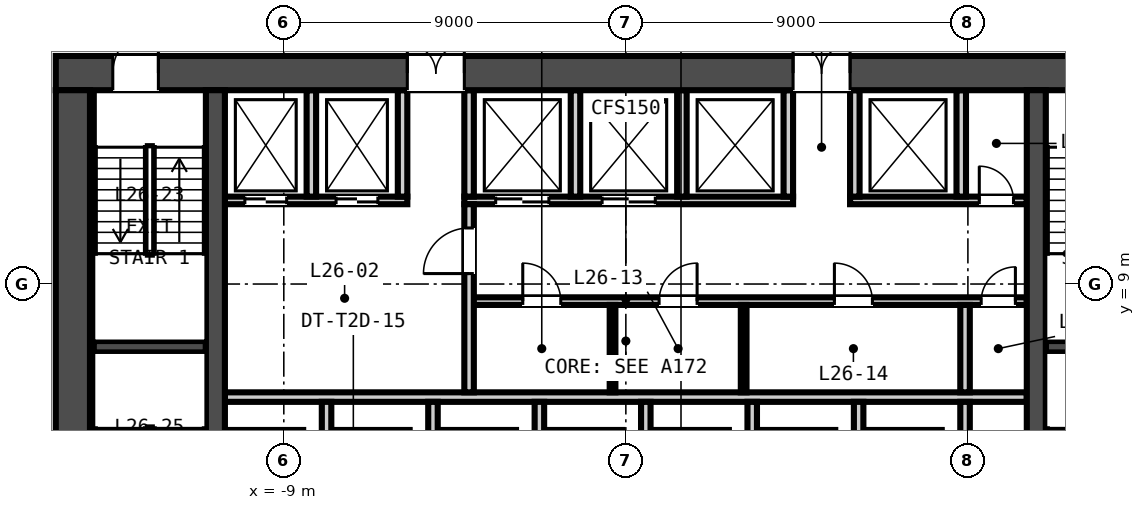
"""IFC4 building model, lengths in metres.
Left out: names, types, materials, properties, quantities, classifications, styles, units other than length and angle.
Written with IfcOpenShell. Run it as: python <this file> out.ifc"""

import sys

from ifc_helpers import new_model, si_unit, direction, frame, frame_2d, origin, place, context, subcontext, project, spatial, rectangle, extrude, element, fill, save


model = new_model("IFC4")
c1 = context("Model", 3, precision=1e-05, world=origin(), true_north=direction((0.0, 1.0)))
c2 = subcontext(c1, "Body", "Model", "MODEL_VIEW")
j1 = project(units=[si_unit("LENGTHUNIT", "METRE"), si_unit("PLANEANGLEUNIT", "RADIAN")], contexts=[c1])
p1 = place(None, origin())
s1 = spatial("IfcSite", under=j1, at=p1, CompositionType="ELEMENT")
p2 = place(p1, origin())
s2 = spatial("IfcBuilding", under=s1, at=p2, CompositionType="ELEMENT")
p3 = place(p2, frame((0.0, 0.0, 109.85)))
s3 = spatial("IfcBuildingStorey", under=s2, at=p3, CompositionType="ELEMENT", Elevation=109.85)
p4 = place(p3, frame((-15.0, 14.55, -0.15), z_axis=(0.0, 0.0, 1.0), x_axis=(1.0, 0.0, 0.0)))
e1 = element("IfcWall", 1, at=p4, inside=s3, PredefinedType="SOLIDWALL", context=c2, shape_type="SweptSolid", body=[
    extrude(rectangle(XDim=30.0, YDim=0.9, at=frame_2d((15.0, 0.0))), origin(), (0.0, 0.0, 1.0), 3.65),
])
p5 = place(p4, frame((9.25, 0.0, 0.15)))
e2 = element("IfcOpeningElement", 2, at=p5, cuts=e1, PredefinedType="OPENING", context=c2, shape_type="SweptSolid", body=[
    extrude(rectangle(XDim=1.5, YDim=2.1, at=frame_2d((0.75, 1.05))), frame((0.0, 0.46, 0.0), z_axis=(0.0, -1.0, 0.0), x_axis=(1.0, 0.0, 0.0)), (0.0, 0.0, 1.0), 0.92),
])
p6 = place(p4, frame((19.4, 0.0, 0.15)))
e3 = element("IfcOpeningElement", 3, at=p6, cuts=e1, PredefinedType="OPENING", context=c2, shape_type="SweptSolid", body=[
    extrude(rectangle(XDim=1.5, YDim=2.1, at=frame_2d((0.75, 1.05))), frame((0.0, 0.46, 0.0), z_axis=(0.0, -1.0, 0.0), x_axis=(1.0, 0.0, 0.0)), (0.0, 0.0, 1.0), 0.92),
])
p7 = place(p4, frame((1.5, 0.0, 0.15)))
e4 = element("IfcOpeningElement", 4, at=p7, cuts=e1, PredefinedType="OPENING", context=c2, shape_type="SweptSolid", body=[
    extrude(rectangle(XDim=1.2, YDim=2.1, at=frame_2d((0.6, 1.05))), frame((0.0, 0.46, 0.0), z_axis=(0.0, -1.0, 0.0), x_axis=(1.0, 0.0, 0.0)), (0.0, 0.0, 1.0), 0.92),
])
p8 = place(p4, frame((27.3, 0.0, 0.15)))
e5 = element("IfcOpeningElement", 5, at=p8, cuts=e1, PredefinedType="OPENING", context=c2, shape_type="SweptSolid", body=[
    extrude(rectangle(XDim=1.2, YDim=2.1, at=frame_2d((0.6, 1.05))), frame((0.0, 0.46, 0.0), z_axis=(0.0, -1.0, 0.0), x_axis=(1.0, 0.0, 0.0)), (0.0, 0.0, 1.0), 0.92),
])
p9 = place(p3, frame((-14.55, 0.9, -0.15), z_axis=(0.0, 0.0, 1.0), x_axis=(0.0, 1.0, 0.0)))
e6 = element("IfcWall", 6, at=p9, inside=s3, PredefinedType="SOLIDWALL", context=c2, shape_type="SweptSolid", body=[
    extrude(rectangle(XDim=13.2, YDim=0.9, at=frame_2d((6.6, 0.0))), origin(), (0.0, 0.0, 1.0), 3.65),
])
for number, where, z_axis, x_axis in (
    (7, (-10.8, 0.9, -0.15), (0.0, 0.0, 1.0), (0.0, 1.0, 0.0)),
    (8, (10.8, 0.9, -0.15), (0.0, 0.0, 1.0), (0.0, 1.0, 0.0)),
):
    element("IfcWall", number, at=place(p3, frame(where, z_axis=z_axis, x_axis=x_axis)), inside=s3, PredefinedType="SOLIDWALL", context=c2, shape_type="SweptSolid", body=[
        extrude(rectangle(XDim=13.2, YDim=0.5, at=frame_2d((6.6, 0.0))), origin(), (0.0, 0.0, 1.0), 3.65),
    ])
p10 = place(p3, frame((-10.55, 6.025, 0.0), z_axis=(0.0, 0.0, 1.0), x_axis=(1.0, 0.0, 0.0)))
e9 = element("IfcWall", 9, at=p10, inside=s3, PredefinedType="PARTITIONING", context=c2, shape_type="SweptSolid", body=[
    extrude(rectangle(XDim=21.1, YDim=0.25, at=frame_2d((10.55, 0.0))), origin(), (0.0, 0.0, 1.0), 3.5),
])
p11 = place(p3, frame((-4.125, 8.55, 0.0), z_axis=(0.0, 0.0, 1.0), x_axis=(1.0, 0.0, 0.0)))
e10 = element("IfcWall", 10, at=p11, inside=s3, PredefinedType="PARTITIONING", context=c2, shape_type="SweptSolid", body=[
    extrude(rectangle(XDim=14.675, YDim=0.2, at=frame_2d((7.337, 0.0))), origin(), (0.0, 0.0, 1.0), 3.5),
])
p12 = place(p11, frame((1.413, 0.0, 0.0)))
e11 = element("IfcOpeningElement", 11, at=p12, cuts=e10, PredefinedType="OPENING", context=c2, shape_type="SweptSolid", body=[
    extrude(rectangle(XDim=1.0, YDim=2.1, at=frame_2d((0.5, 1.05))), frame((0.0, 0.11, 0.0), z_axis=(0.0, -1.0, 0.0), x_axis=(1.0, 0.0, 0.0)), (0.0, 0.0, 1.0), 0.22),
])
p13 = place(p11, frame((5.0, 0.0, 0.0)))
e12 = element("IfcOpeningElement", 12, at=p13, cuts=e10, PredefinedType="OPENING", context=c2, shape_type="SweptSolid", body=[
    extrude(rectangle(XDim=1.0, YDim=2.1, at=frame_2d((0.5, 1.05))), frame((0.0, 0.11, 0.0), z_axis=(0.0, -1.0, 0.0), x_axis=(1.0, 0.0, 0.0)), (0.0, 0.0, 1.0), 0.22),
])
p14 = place(p11, frame((9.613, 0.0, 0.0)))
e13 = element("IfcOpeningElement", 13, at=p14, cuts=e10, PredefinedType="OPENING", context=c2, shape_type="SweptSolid", body=[
    extrude(rectangle(XDim=1.0, YDim=2.1, at=frame_2d((0.5, 1.05))), frame((0.0, 0.11, 0.0), z_axis=(0.0, -1.0, 0.0), x_axis=(1.0, 0.0, 0.0)), (0.0, 0.0, 1.0), 0.22),
])
p15 = place(p11, frame((13.475, 0.0, 0.0)))
e14 = element("IfcOpeningElement", 14, at=p15, cuts=e10, PredefinedType="OPENING", context=c2, shape_type="SweptSolid", body=[
    extrude(rectangle(XDim=0.9, YDim=2.1, at=frame_2d((0.45, 1.05))), frame((0.0, 0.11, 0.0), z_axis=(0.0, -1.0, 0.0), x_axis=(1.0, 0.0, 0.0)), (0.0, 0.0, 1.0), 0.22),
])
p16 = place(p3, frame((-10.55, 11.2, 0.0), z_axis=(0.0, 0.0, 1.0), x_axis=(1.0, 0.0, 0.0)))
e15 = element("IfcWall", 15, at=p16, inside=s3, PredefinedType="PARTITIONING", context=c2, shape_type="SweptSolid", body=[
    extrude(rectangle(XDim=4.8, YDim=0.2, at=frame_2d((2.4, 0.0))), origin(), (0.0, 0.0, 1.0), 3.5),
])
p17 = place(p16, frame((0.525, 0.0, 0.0)))
e16 = element("IfcOpeningElement", 16, at=p17, cuts=e15, PredefinedType="OPENING", context=c2, shape_type="SweptSolid", body=[
    extrude(rectangle(XDim=1.1, YDim=2.1, at=frame_2d((0.55, 1.05))), frame((0.0, 0.11, 0.0), z_axis=(0.0, -1.0, 0.0), x_axis=(1.0, 0.0, 0.0)), (0.0, 0.0, 1.0), 0.22),
])
p18 = place(p16, frame((2.925, 0.0, 0.0)))
e17 = element("IfcOpeningElement", 17, at=p18, cuts=e15, PredefinedType="OPENING", context=c2, shape_type="SweptSolid", body=[
    extrude(rectangle(XDim=1.1, YDim=2.1, at=frame_2d((0.55, 1.05))), frame((0.0, 0.11, 0.0), z_axis=(0.0, -1.0, 0.0), x_axis=(1.0, 0.0, 0.0)), (0.0, 0.0, 1.0), 0.22),
])
p19 = place(p3, frame((-4.25, 11.2, 0.0), z_axis=(0.0, 0.0, 1.0), x_axis=(1.0, 0.0, 0.0)))
e18 = element("IfcWall", 18, at=p19, inside=s3, PredefinedType="PARTITIONING", context=c2, shape_type="SweptSolid", body=[
    extrude(rectangle(XDim=8.65, YDim=0.2, at=frame_2d((4.325, 0.0))), origin(), (0.0, 0.0, 1.0), 3.5),
])
p20 = place(p19, frame((0.825, 0.0, 0.0)))
e19 = element("IfcOpeningElement", 19, at=p20, cuts=e18, PredefinedType="OPENING", context=c2, shape_type="SweptSolid", body=[
    extrude(rectangle(XDim=1.4, YDim=2.1, at=frame_2d((0.7, 1.05))), frame((0.0, 0.11, 0.0), z_axis=(0.0, -1.0, 0.0), x_axis=(1.0, 0.0, 0.0)), (0.0, 0.0, 1.0), 0.22),
])
p21 = place(p19, frame((3.625, 0.0, 0.0)))
e20 = element("IfcOpeningElement", 20, at=p21, cuts=e18, PredefinedType="OPENING", context=c2, shape_type="SweptSolid", body=[
    extrude(rectangle(XDim=1.4, YDim=2.1, at=frame_2d((0.7, 1.05))), frame((0.0, 0.11, 0.0), z_axis=(0.0, -1.0, 0.0), x_axis=(1.0, 0.0, 0.0)), (0.0, 0.0, 1.0), 0.22),
])
p22 = place(p3, frame((5.9, 11.2, 0.0), z_axis=(0.0, 0.0, 1.0), x_axis=(1.0, 0.0, 0.0)))
e21 = element("IfcWall", 21, at=p22, inside=s3, PredefinedType="PARTITIONING", context=c2, shape_type="SweptSolid", body=[
    extrude(rectangle(XDim=4.65, YDim=0.2, at=frame_2d((2.325, 0.0))), origin(), (0.0, 0.0, 1.0), 3.5),
])
p23 = place(p22, frame((3.4, 0.0, 0.0)))
e22 = element("IfcOpeningElement", 22, at=p23, cuts=e21, PredefinedType="OPENING", context=c2, shape_type="SweptSolid", body=[
    extrude(rectangle(XDim=0.9, YDim=2.1, at=frame_2d((0.45, 1.05))), frame((0.0, 0.11, 0.0), z_axis=(0.0, -1.0, 0.0), x_axis=(1.0, 0.0, 0.0)), (0.0, 0.0, 1.0), 0.22),
])
p24 = place(p3, frame((-4.125, 6.15, 0.0), z_axis=(0.0, 0.0, 1.0), x_axis=(0.0, 1.0, 0.0)))
e23 = element("IfcWall", 23, at=p24, inside=s3, PredefinedType="PARTITIONING", context=c2, shape_type="SweptSolid", body=[
    extrude(rectangle(XDim=4.95, YDim=0.25, at=frame_2d((2.475, 0.0))), origin(), (0.0, 0.0, 1.0), 3.5),
])
p25 = place(p24, frame((3.125, 0.0, 0.0)))
e24 = element("IfcOpeningElement", 24, at=p25, cuts=e23, PredefinedType="OPENING", context=c2, shape_type="SweptSolid", body=[
    extrude(rectangle(XDim=1.2, YDim=2.1, at=frame_2d((0.6, 1.05))), frame((0.0, 0.135, 0.0), z_axis=(0.0, -1.0, 0.0), x_axis=(1.0, 0.0, 0.0)), (0.0, 0.0, 1.0), 0.27),
])
for number, where, z_axis, x_axis in (
    (25, (-7.875, 3.6, 0.0), (0.0, 0.0, 1.0), (0.0, 1.0, 0.0)),
    (26, (-5.075, 3.6, 0.0), (0.0, 0.0, 1.0), (0.0, 1.0, 0.0)),
    (27, (-2.275, 3.6, 0.0), (0.0, 0.0, 1.0), (0.0, 1.0, 0.0)),
    (28, (0.525, 3.6, 0.0), (0.0, 0.0, 1.0), (0.0, 1.0, 0.0)),
    (29, (3.325, 3.6, 0.0), (0.0, 0.0, 1.0), (0.0, 1.0, 0.0)),
    (30, (6.125, 3.6, 0.0), (0.0, 0.0, 1.0), (0.0, 1.0, 0.0)),
    (31, (8.925, 3.6, 0.0), (0.0, 0.0, 1.0), (0.0, 1.0, 0.0)),
):
    element("IfcWall", number, at=place(p3, frame(where, z_axis=z_axis, x_axis=x_axis)), inside=s3, PredefinedType="PARTITIONING", context=c2, shape_type="SweptSolid", body=[
        extrude(rectangle(XDim=2.3, YDim=0.25, at=frame_2d((1.15, 0.0))), origin(), (0.0, 0.0, 1.0), 3.5),
    ])
for number, where, z_axis, x_axis in (
    (32, (-0.35, 6.15, 0.0), (0.0, 0.0, 1.0), (0.0, 1.0, 0.0)),
    (33, (3.1, 6.15, 0.0), (0.0, 0.0, 1.0), (0.0, 1.0, 0.0)),
):
    element("IfcWall", number, at=place(p3, frame(where, z_axis=z_axis, x_axis=x_axis)), inside=s3, PredefinedType="PARTITIONING", context=c2, shape_type="SweptSolid", body=[
        extrude(rectangle(XDim=2.3, YDim=0.15, at=frame_2d((1.15, 0.0))), origin(), (0.0, 0.0, 1.0), 3.5),
    ])
p26 = place(p3, frame((8.925, 6.15, 0.0), z_axis=(0.0, 0.0, 1.0), x_axis=(0.0, 1.0, 0.0)))
e34 = element("IfcWall", 34, at=p26, inside=s3, PredefinedType="PARTITIONING", context=c2, shape_type="SweptSolid", body=[
    extrude(rectangle(XDim=2.3, YDim=0.25, at=frame_2d((1.15, 0.0))), origin(), (0.0, 0.0, 1.0), 3.5),
])
for number, where, z_axis, x_axis in (
    (35, (-8.275, 11.3, 0.0), (0.0, 0.0, 1.0), (0.0, 1.0, 0.0)),
    (36, (-5.875, 11.3, 0.0), (0.0, 0.0, 1.0), (0.0, 1.0, 0.0)),
    (37, (-4.125, 11.3, 0.0), (0.0, 0.0, 1.0), (0.0, 1.0, 0.0)),
    (38, (-1.325, 11.3, 0.0), (0.0, 0.0, 1.0), (0.0, 1.0, 0.0)),
    (39, (1.475, 11.3, 0.0), (0.0, 0.0, 1.0), (0.0, 1.0, 0.0)),
    (40, (4.275, 11.3, 0.0), (0.0, 0.0, 1.0), (0.0, 1.0, 0.0)),
    (41, (6.025, 11.3, 0.0), (0.0, 0.0, 1.0), (0.0, 1.0, 0.0)),
    (42, (8.825, 11.3, 0.0), (0.0, 0.0, 1.0), (0.0, 1.0, 0.0)),
):
    element("IfcWall", number, at=place(p3, frame(where, z_axis=z_axis, x_axis=x_axis)), inside=s3, PredefinedType="PARTITIONING", context=c2, shape_type="SweptSolid", body=[
        extrude(rectangle(XDim=2.8, YDim=0.25, at=frame_2d((1.4, 0.0))), origin(), (0.0, 0.0, 1.0), 3.5),
    ])
p27 = place(p3, frame((-14.0, 7.35, 0.0), z_axis=(0.0, 0.0, 1.0), x_axis=(1.0, 0.0, 0.0)))
e43 = element("IfcWall", 43, at=p27, inside=s3, PredefinedType="SOLIDWALL", context=c2, shape_type="SweptSolid", body=[
    extrude(rectangle(XDim=2.95, YDim=0.3, at=frame_2d((1.475, 0.0))), origin(), (0.0, 0.0, 1.0), 3.5),
])
p28 = place(p3, frame((-14.05, 0.9, 0.0), z_axis=(0.0, 0.0, 1.0), x_axis=(0.0, 1.0, 0.0)))
e44 = element("IfcWall", 44, at=p28, inside=s3, PredefinedType="SOLIDWALL", context=c2, shape_type="SweptSolid", body=[
    extrude(rectangle(XDim=13.2, YDim=0.1, at=frame_2d((6.6, 0.0))), origin(), (0.0, 0.0, 1.0), 3.5),
])
p29 = place(p3, frame((11.05, 7.35, 0.0), z_axis=(0.0, 0.0, 1.0), x_axis=(1.0, 0.0, 0.0)))
e45 = element("IfcWall", 45, at=p29, inside=s3, PredefinedType="SOLIDWALL", context=c2, shape_type="SweptSolid", body=[
    extrude(rectangle(XDim=2.95, YDim=0.3, at=frame_2d((1.475, 0.0))), origin(), (0.0, 0.0, 1.0), 3.5),
])
p30 = place(p25, origin())
e46 = element("IfcDoor", 46, at=p30, inside=s3, OperationType="SINGLE_SWING_LEFT", PredefinedType="DOOR", context=c2, shape_type="SweptSolid", body=[
    extrude(rectangle(XDim=1.2, YDim=2.1, at=frame_2d((0.6, 1.05))), frame((0.0, 0.025, 0.0), z_axis=(0.0, -1.0, 0.0), x_axis=(1.0, 0.0, 0.0)), (0.0, 0.0, 1.0), 0.05),
])
fill(e24, e46)
p31 = place(p12, origin())
e47 = element("IfcDoor", 47, at=p31, inside=s3, OperationType="SINGLE_SWING_LEFT", PredefinedType="DOOR", context=c2, shape_type="SweptSolid", body=[
    extrude(rectangle(XDim=1.0, YDim=2.1, at=frame_2d((0.5, 1.05))), frame((0.0, 0.025, 0.0), z_axis=(0.0, -1.0, 0.0), x_axis=(1.0, 0.0, 0.0)), (0.0, 0.0, 1.0), 0.05),
])
fill(e11, e47)
p32 = place(p13, origin())
e48 = element("IfcDoor", 48, at=p32, inside=s3, OperationType="SINGLE_SWING_RIGHT", PredefinedType="DOOR", context=c2, shape_type="SweptSolid", body=[
    extrude(rectangle(XDim=1.0, YDim=2.1, at=frame_2d((0.5, 1.05))), frame((0.0, 0.025, 0.0), z_axis=(0.0, -1.0, 0.0), x_axis=(1.0, 0.0, 0.0)), (0.0, 0.0, 1.0), 0.05),
])
fill(e12, e48)
p33 = place(p14, origin())
e49 = element("IfcDoor", 49, at=p33, inside=s3, OperationType="SINGLE_SWING_LEFT", PredefinedType="DOOR", context=c2, shape_type="SweptSolid", body=[
    extrude(rectangle(XDim=1.0, YDim=2.1, at=frame_2d((0.5, 1.05))), frame((0.0, 0.025, 0.0), z_axis=(0.0, -1.0, 0.0), x_axis=(1.0, 0.0, 0.0)), (0.0, 0.0, 1.0), 0.05),
])
fill(e13, e49)
p34 = place(p15, origin())
e50 = element("IfcDoor", 50, at=p34, inside=s3, OperationType="SINGLE_SWING_RIGHT", PredefinedType="DOOR", context=c2, shape_type="SweptSolid", body=[
    extrude(rectangle(XDim=0.9, YDim=2.1, at=frame_2d((0.45, 1.05))), frame((0.0, 0.025, 0.0), z_axis=(0.0, -1.0, 0.0), x_axis=(1.0, 0.0, 0.0)), (0.0, 0.0, 1.0), 0.05),
])
fill(e14, e50)
p35 = place(p17, origin())
e51 = element("IfcDoor", 51, at=p35, inside=s3, OperationType="DOUBLE_DOOR_SLIDING", PredefinedType="DOOR", context=c2, shape_type="SweptSolid", body=[
    extrude(rectangle(XDim=1.1, YDim=2.1, at=frame_2d((0.55, 1.05))), frame((0.0, 0.025, 0.0), z_axis=(0.0, -1.0, 0.0), x_axis=(1.0, 0.0, 0.0)), (0.0, 0.0, 1.0), 0.05),
])
fill(e16, e51)
p36 = place(p18, origin())
e52 = element("IfcDoor", 52, at=p36, inside=s3, OperationType="DOUBLE_DOOR_SLIDING", PredefinedType="DOOR", context=c2, shape_type="SweptSolid", body=[
    extrude(rectangle(XDim=1.1, YDim=2.1, at=frame_2d((0.55, 1.05))), frame((0.0, 0.025, 0.0), z_axis=(0.0, -1.0, 0.0), x_axis=(1.0, 0.0, 0.0)), (0.0, 0.0, 1.0), 0.05),
])
fill(e17, e52)
p37 = place(p20, origin())
e53 = element("IfcDoor", 53, at=p37, inside=s3, OperationType="DOUBLE_DOOR_SLIDING", PredefinedType="DOOR", context=c2, shape_type="SweptSolid", body=[
    extrude(rectangle(XDim=1.4, YDim=2.1, at=frame_2d((0.7, 1.05))), frame((0.0, 0.025, 0.0), z_axis=(0.0, -1.0, 0.0), x_axis=(1.0, 0.0, 0.0)), (0.0, 0.0, 1.0), 0.05),
])
fill(e19, e53)
p38 = place(p21, origin())
e54 = element("IfcDoor", 54, at=p38, inside=s3, OperationType="DOUBLE_DOOR_SLIDING", PredefinedType="DOOR", context=c2, shape_type="SweptSolid", body=[
    extrude(rectangle(XDim=1.4, YDim=2.1, at=frame_2d((0.7, 1.05))), frame((0.0, 0.025, 0.0), z_axis=(0.0, -1.0, 0.0), x_axis=(1.0, 0.0, 0.0)), (0.0, 0.0, 1.0), 0.05),
])
fill(e20, e54)
p39 = place(p23, origin())
e55 = element("IfcDoor", 55, at=p39, inside=s3, OperationType="SINGLE_SWING_LEFT", PredefinedType="DOOR", context=c2, shape_type="SweptSolid", body=[
    extrude(rectangle(XDim=0.9, YDim=2.1, at=frame_2d((0.45, 1.05))), frame((0.0, 0.025, 0.0), z_axis=(0.0, -1.0, 0.0), x_axis=(1.0, 0.0, 0.0)), (0.0, 0.0, 1.0), 0.05),
])
fill(e22, e55)
p40 = place(p5, origin())
e56 = element("IfcDoor", 56, at=p40, inside=s3, OperationType="DOUBLE_DOOR_SINGLE_SWING", PredefinedType="DOOR", context=c2, shape_type="SweptSolid", body=[
    extrude(rectangle(XDim=1.5, YDim=2.1, at=frame_2d((0.75, 1.05))), frame((0.0, 0.025, 0.0), z_axis=(0.0, -1.0, 0.0), x_axis=(1.0, 0.0, 0.0)), (0.0, 0.0, 1.0), 0.05),
])
fill(e2, e56)
p41 = place(p6, origin())
e57 = element("IfcDoor", 57, at=p41, inside=s3, OperationType="DOUBLE_DOOR_SINGLE_SWING", PredefinedType="DOOR", context=c2, shape_type="SweptSolid", body=[
    extrude(rectangle(XDim=1.5, YDim=2.1, at=frame_2d((0.75, 1.05))), frame((0.0, 0.025, 0.0), z_axis=(0.0, -1.0, 0.0), x_axis=(1.0, 0.0, 0.0)), (0.0, 0.0, 1.0), 0.05),
])
fill(e3, e57)
p42 = place(p7, origin())
e58 = element("IfcDoor", 58, at=p42, inside=s3, OperationType="SINGLE_SWING_RIGHT", PredefinedType="DOOR", context=c2, shape_type="SweptSolid", body=[
    extrude(rectangle(XDim=1.2, YDim=2.1, at=frame_2d((0.6, 1.05))), frame((0.0, 0.025, 0.0), z_axis=(0.0, -1.0, 0.0), x_axis=(1.0, 0.0, 0.0)), (0.0, 0.0, 1.0), 0.05),
])
fill(e4, e58)
save(model, sys.argv[1])
